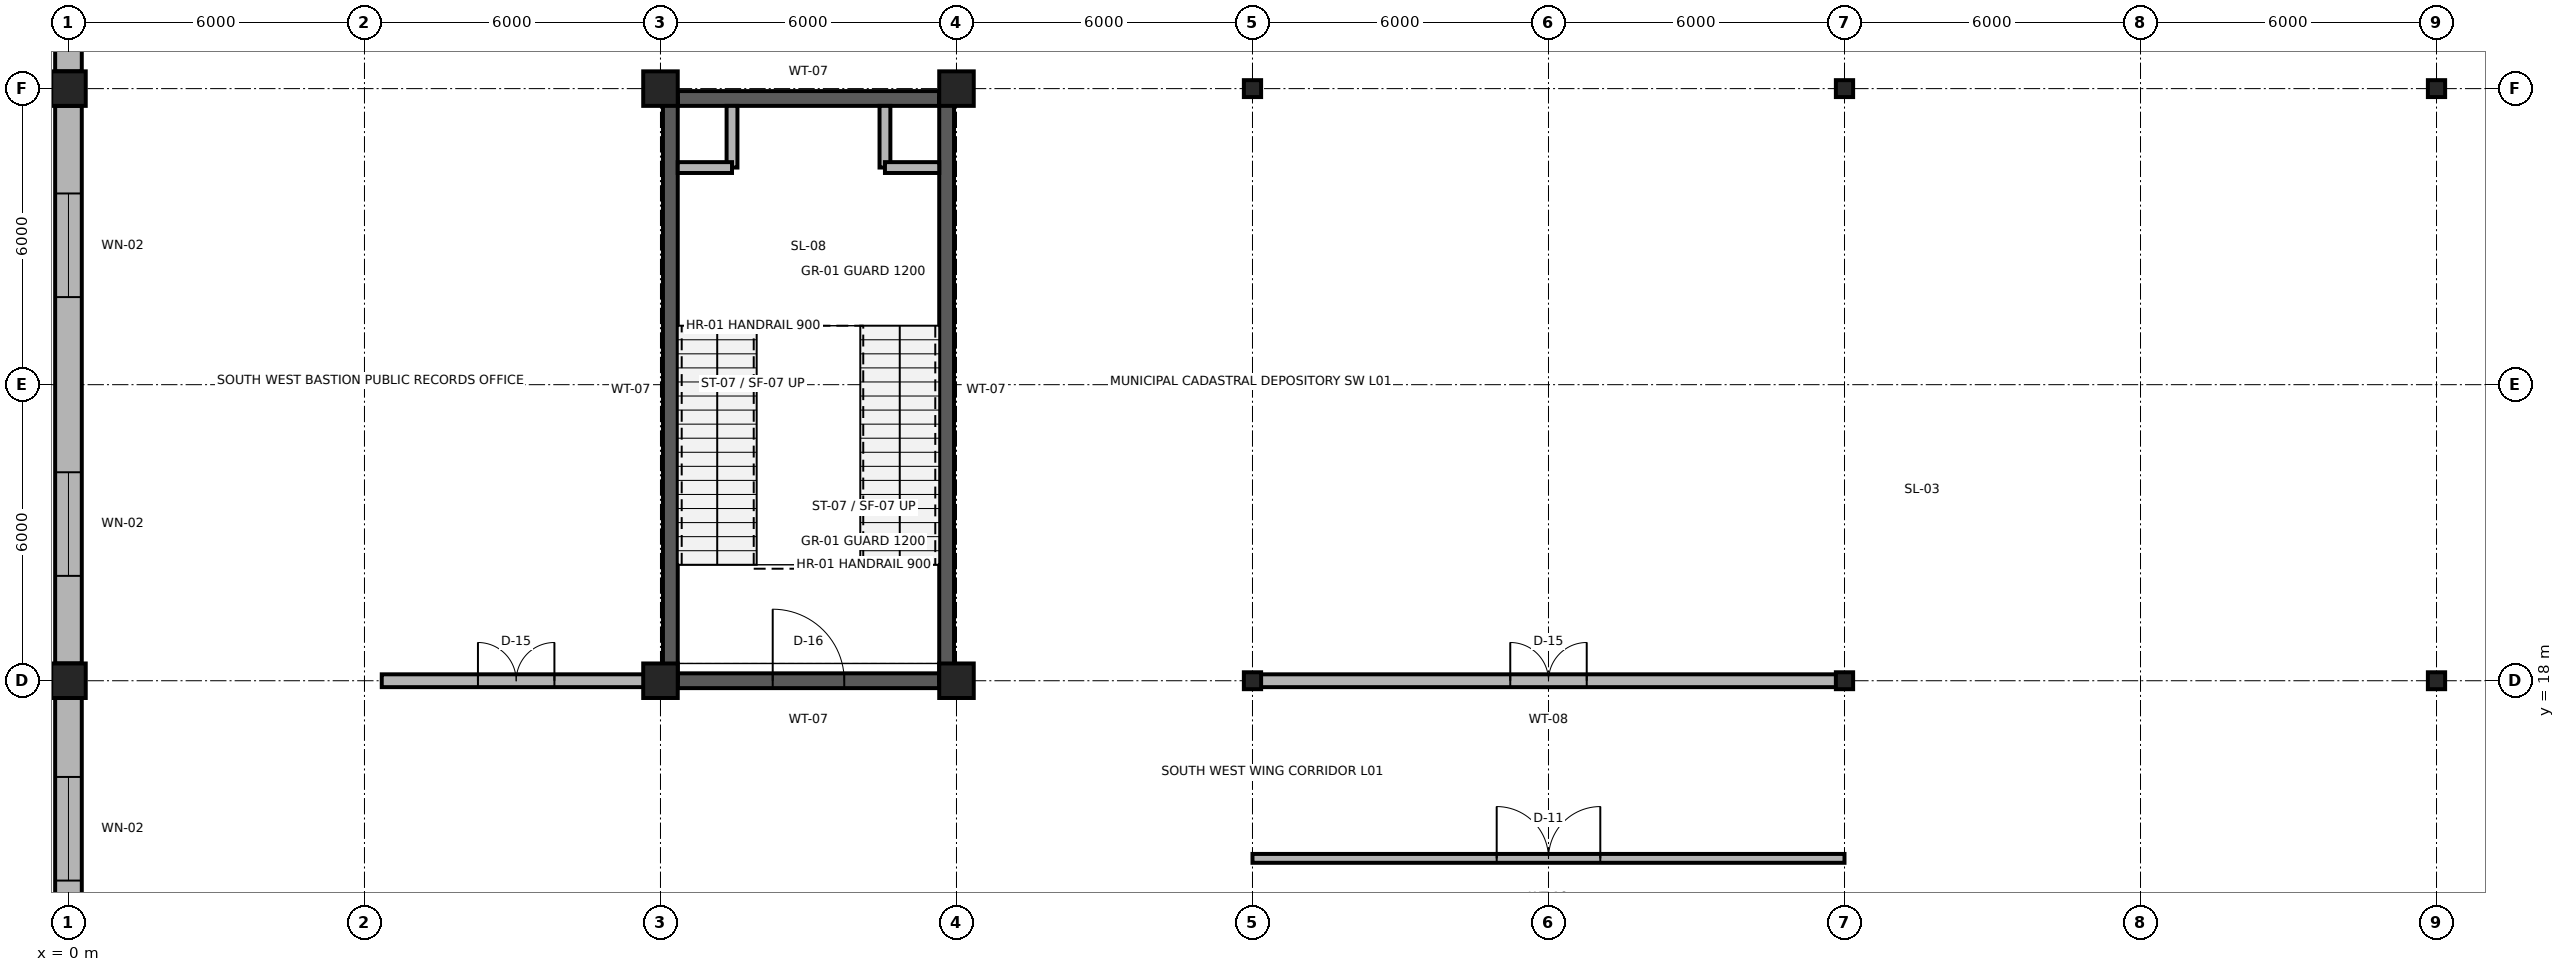
"""IFC4 building model, lengths in metres.
Left out: names, types, materials, properties, quantities, classifications, styles, units other than length and angle.
Written with IfcOpenShell. Run it as: python <this file> out.ifc"""

import sys

from ifc_helpers import new_model, si_unit, direction, frame, frame_2d, origin, origin_2d, place, context, subcontext, project, spatial, rectangle, i_section, extrude, element, fill, save


model = new_model("IFC4")
c1 = context("Model", 3, precision=1e-05, world=origin(), true_north=direction((0.0, 1.0)))
c2 = subcontext(c1, "Body", "Model", "MODEL_VIEW")
j1 = project(units=[si_unit("LENGTHUNIT", "METRE"), si_unit("PLANEANGLEUNIT", "RADIAN")], contexts=[c1])
p1 = place(None, origin())
s1 = spatial("IfcSite", under=j1, at=p1, CompositionType="ELEMENT")
p2 = place(p1, origin())
s2 = spatial("IfcBuilding", under=s1, at=p2, CompositionType="ELEMENT")
p3 = place(p2, origin())
s3 = spatial("IfcBuildingStorey", under=s2, at=p3, CompositionType="ELEMENT", Elevation=0.0)
for number, where, z_axis, x_axis in (
    (1, (0.0, 18.0, 0.0), (0.0, 0.0, 1.0), (1.0, 0.0, 0.0)),
    (2, (12.0, 18.0, 0.0), (0.0, 0.0, 1.0), (1.0, 0.0, 0.0)),
    (3, (18.0, 18.0, 0.0), (0.0, 0.0, 1.0), (1.0, 0.0, 0.0)),
):
    element("IfcColumn", number, at=place(p3, frame(where, z_axis=z_axis, x_axis=x_axis)), inside=s3, PredefinedType="COLUMN", context=c2, shape_type="SweptSolid", body=[
        extrude(rectangle(XDim=0.7, YDim=0.7, at=origin_2d()), origin(), (0.0, 0.0, 1.0), 6.0),
    ])
for number, where, z_axis, x_axis in (
    (4, (24.0, 18.0, 0.0), (0.0, 0.0, 1.0), (1.0, 0.0, 0.0)),
    (5, (36.0, 18.0, 0.0), (0.0, 0.0, 1.0), (1.0, 0.0, 0.0)),
    (6, (48.0, 18.0, 0.0), (0.0, 0.0, 1.0), (1.0, 0.0, 0.0)),
):
    element("IfcColumn", number, at=place(p3, frame(where, z_axis=z_axis, x_axis=x_axis)), inside=s3, PredefinedType="COLUMN", context=c2, shape_type="SweptSolid", body=[
        extrude(i_section(OverallWidth=0.35, OverallDepth=0.343, WebThickness=0.01, FlangeThickness=0.015, FilletRadius=0.02, at=origin_2d()), origin(), (0.0, 0.0, 1.0), 6.0),
    ])
for number, where, z_axis, x_axis in (
    (7, (0.0, 30.0, 0.0), (0.0, 0.0, 1.0), (1.0, 0.0, 0.0)),
    (8, (12.0, 30.0, 0.0), (0.0, 0.0, 1.0), (1.0, 0.0, 0.0)),
    (9, (18.0, 30.0, 0.0), (0.0, 0.0, 1.0), (1.0, 0.0, 0.0)),
):
    element("IfcColumn", number, at=place(p3, frame(where, z_axis=z_axis, x_axis=x_axis)), inside=s3, PredefinedType="COLUMN", context=c2, shape_type="SweptSolid", body=[
        extrude(rectangle(XDim=0.7, YDim=0.7, at=origin_2d()), origin(), (0.0, 0.0, 1.0), 6.0),
    ])
for number, where, z_axis, x_axis in (
    (10, (24.0, 30.0, 0.0), (0.0, 0.0, 1.0), (1.0, 0.0, 0.0)),
    (11, (36.0, 30.0, 0.0), (0.0, 0.0, 1.0), (1.0, 0.0, 0.0)),
    (12, (48.0, 30.0, 0.0), (0.0, 0.0, 1.0), (1.0, 0.0, 0.0)),
):
    element("IfcColumn", number, at=place(p3, frame(where, z_axis=z_axis, x_axis=x_axis)), inside=s3, PredefinedType="COLUMN", context=c2, shape_type="SweptSolid", body=[
        extrude(i_section(OverallWidth=0.35, OverallDepth=0.343, WebThickness=0.01, FlangeThickness=0.015, FilletRadius=0.02, at=origin_2d()), origin(), (0.0, 0.0, 1.0), 6.0),
    ])
p4 = place(p3, frame((0.0, 12.35, 0.0), z_axis=(0.0, 0.0, 1.0), x_axis=(0.0, 1.0, 0.0)))
e13 = element("IfcWall", 13, at=p4, inside=s3, PredefinedType="SOLIDWALL", context=c2, shape_type="SweptSolid", body=[
    extrude(rectangle(XDim=5.3, YDim=0.54, at=frame_2d((2.65, 0.0))), origin(), (0.0, 0.0, 1.0), 5.31),
])
p5 = place(p4, frame((1.6, 0.0, 0.85)))
e14 = element("IfcOpeningElement", 14, at=p5, cuts=e13, PredefinedType="OPENING", context=c2, shape_type="SweptSolid", body=[
    extrude(rectangle(XDim=2.1, YDim=3.4, at=frame_2d((1.05, 1.7))), frame((0.0, 0.285, 0.0), z_axis=(0.0, -1.0, 0.0), x_axis=(1.0, 0.0, 0.0)), (0.0, 0.0, 1.0), 0.57),
])
p6 = place(p3, frame((0.0, 18.35, 0.0), z_axis=(0.0, 0.0, 1.0), x_axis=(0.0, 1.0, 0.0)))
e15 = element("IfcWall", 15, at=p6, inside=s3, PredefinedType="SOLIDWALL", context=c2, shape_type="SweptSolid", body=[
    extrude(rectangle(XDim=11.3, YDim=0.54, at=frame_2d((5.65, 0.0))), origin(), (0.0, 0.0, 1.0), 5.31),
])
p7 = place(p6, frame((1.775, 0.0, 0.85)))
e16 = element("IfcOpeningElement", 16, at=p7, cuts=e15, PredefinedType="OPENING", context=c2, shape_type="SweptSolid", body=[
    extrude(rectangle(XDim=2.1, YDim=3.4, at=frame_2d((1.05, 1.7))), frame((0.0, 0.285, 0.0), z_axis=(0.0, -1.0, 0.0), x_axis=(1.0, 0.0, 0.0)), (0.0, 0.0, 1.0), 0.57),
])
p8 = place(p6, frame((7.425, 0.0, 0.85)))
e17 = element("IfcOpeningElement", 17, at=p8, cuts=e15, PredefinedType="OPENING", context=c2, shape_type="SweptSolid", body=[
    extrude(rectangle(XDim=2.1, YDim=3.4, at=frame_2d((1.05, 1.7))), frame((0.0, 0.285, 0.0), z_axis=(0.0, -1.0, 0.0), x_axis=(1.0, 0.0, 0.0)), (0.0, 0.0, 1.0), 0.57),
])
p9 = place(p3, frame((0.0, 30.35, 0.0), z_axis=(0.0, 0.0, 1.0), x_axis=(0.0, 1.0, 0.0)))
e18 = element("IfcWall", 18, at=p9, inside=s3, PredefinedType="SOLIDWALL", context=c2, shape_type="SweptSolid", body=[
    extrude(rectangle(XDim=5.3, YDim=0.54, at=frame_2d((2.65, 0.0))), origin(), (0.0, 0.0, 1.0), 5.31),
])
p10 = place(p9, frame((1.6, 0.0, 0.85)))
e19 = element("IfcOpeningElement", 19, at=p10, cuts=e18, PredefinedType="OPENING", context=c2, shape_type="SweptSolid", body=[
    extrude(rectangle(XDim=2.1, YDim=3.4, at=frame_2d((1.05, 1.7))), frame((0.0, 0.285, 0.0), z_axis=(0.0, -1.0, 0.0), x_axis=(1.0, 0.0, 0.0)), (0.0, 0.0, 1.0), 0.57),
])
p11 = place(p3, frame((12.35, 18.0, 0.0), z_axis=(0.0, 0.0, 1.0), x_axis=(1.0, 0.0, 0.0)))
e20 = element("IfcWall", 20, at=p11, inside=s3, PredefinedType="SHEAR", context=c2, shape_type="SweptSolid", body=[
    extrude(rectangle(XDim=5.3, YDim=0.3, at=frame_2d((2.65, 0.0))), origin(), (0.0, 0.0, 1.0), 5.76),
])
p12 = place(p11, frame((1.925, 0.0, 0.0)))
e21 = element("IfcOpeningElement", 21, at=p12, cuts=e20, PredefinedType="OPENING", context=c2, shape_type="SweptSolid", body=[
    extrude(rectangle(XDim=1.45, YDim=2.25, at=frame_2d((0.725, 1.125))), frame((0.0, 0.165, 0.0), z_axis=(0.0, -1.0, 0.0), x_axis=(1.0, 0.0, 0.0)), (0.0, 0.0, 1.0), 0.33),
])
p13 = place(p3, frame((12.35, 29.8, 0.0), z_axis=(0.0, 0.0, 1.0), x_axis=(1.0, 0.0, 0.0)))
e22 = element("IfcWall", 22, at=p13, inside=s3, PredefinedType="SHEAR", context=c2, shape_type="SweptSolid", body=[
    extrude(rectangle(XDim=5.3, YDim=0.3, at=frame_2d((2.65, 0.0))), origin(), (0.0, 0.0, 1.0), 5.76),
])
for number, where, z_axis, x_axis in (
    (23, (12.2, 18.0, 0.0), (0.0, 0.0, 1.0), (0.0, 1.0, 0.0)),
    (24, (17.8, 18.0, 0.0), (0.0, 0.0, 1.0), (0.0, 1.0, 0.0)),
):
    element("IfcWall", number, at=place(p3, frame(where, z_axis=z_axis, x_axis=x_axis)), inside=s3, PredefinedType="SHEAR", context=c2, shape_type="SweptSolid", body=[
        extrude(rectangle(XDim=11.8, YDim=0.3, at=frame_2d((5.9, 0.0))), origin(), (0.0, 0.0, 1.0), 5.76),
    ])
p14 = place(p3, frame((13.45, 28.4, 0.0), z_axis=(0.0, 0.0, 1.0), x_axis=(0.0, 1.0, 0.0)))
e25 = element("IfcWall", 25, at=p14, inside=s3, PredefinedType="PARTITIONING", context=c2, shape_type="SweptSolid", body=[
    extrude(rectangle(XDim=1.25, YDim=0.22, at=frame_2d((0.625, 0.0))), origin(), (0.0, 0.0, 1.0), 5.76),
])
p15 = place(p3, frame((12.35, 28.4, 0.0), z_axis=(0.0, 0.0, 1.0), x_axis=(1.0, 0.0, 0.0)))
e26 = element("IfcWall", 26, at=p15, inside=s3, PredefinedType="PARTITIONING", context=c2, shape_type="SweptSolid", body=[
    extrude(rectangle(XDim=1.1, YDim=0.22, at=frame_2d((0.55, 0.0))), origin(), (0.0, 0.0, 1.0), 5.76),
])
p16 = place(p3, frame((16.55, 28.4, 0.0), z_axis=(0.0, 0.0, 1.0), x_axis=(0.0, 1.0, 0.0)))
e27 = element("IfcWall", 27, at=p16, inside=s3, PredefinedType="PARTITIONING", context=c2, shape_type="SweptSolid", body=[
    extrude(rectangle(XDim=1.25, YDim=0.22, at=frame_2d((0.625, 0.0))), origin(), (0.0, 0.0, 1.0), 5.76),
])
p17 = place(p3, frame((16.55, 28.4, 0.0), z_axis=(0.0, 0.0, 1.0), x_axis=(1.0, 0.0, 0.0)))
e28 = element("IfcWall", 28, at=p17, inside=s3, PredefinedType="PARTITIONING", context=c2, shape_type="SweptSolid", body=[
    extrude(rectangle(XDim=1.1, YDim=0.22, at=frame_2d((0.55, 0.0))), origin(), (0.0, 0.0, 1.0), 5.76),
])
p18 = place(p3, frame((24.0, 14.4, 0.0), z_axis=(0.0, 0.0, 1.0), x_axis=(1.0, 0.0, 0.0)))
e29 = element("IfcWall", 29, at=p18, inside=s3, PredefinedType="PARTITIONING", context=c2, shape_type="SweptSolid", body=[
    extrude(rectangle(XDim=12.0, YDim=0.18, at=frame_2d((6.0, 0.0))), origin(), (0.0, 0.0, 1.0), 5.76),
])
p19 = place(p18, frame((4.95, 0.0, 0.0)))
e30 = element("IfcOpeningElement", 30, at=p19, cuts=e29, PredefinedType="OPENING", context=c2, shape_type="SweptSolid", body=[
    extrude(rectangle(XDim=2.1, YDim=2.9, at=frame_2d((1.05, 1.45))), frame((0.0, 0.105, 0.0), z_axis=(0.0, -1.0, 0.0), x_axis=(1.0, 0.0, 0.0)), (0.0, 0.0, 1.0), 0.21),
])
p20 = place(p3, frame((24.0, 18.0, 0.0), z_axis=(0.0, 0.0, 1.0), x_axis=(1.0, 0.0, 0.0)))
e31 = element("IfcWall", 31, at=p20, inside=s3, PredefinedType="PARTITIONING", context=c2, shape_type="SweptSolid", body=[
    extrude(rectangle(XDim=12.0, YDim=0.26, at=frame_2d((6.0, 0.0))), origin(), (0.0, 0.0, 1.0), 5.077),
])
p21 = place(p20, frame((5.225, 0.0, 0.0)))
e32 = element("IfcOpeningElement", 32, at=p21, cuts=e31, PredefinedType="OPENING", context=c2, shape_type="SweptSolid", body=[
    extrude(rectangle(XDim=1.55, YDim=2.3, at=frame_2d((0.775, 1.15))), frame((0.0, 0.145, 0.0), z_axis=(0.0, -1.0, 0.0), x_axis=(1.0, 0.0, 0.0)), (0.0, 0.0, 1.0), 0.29),
])
p22 = place(p3, frame((6.35, 18.0, 0.0), z_axis=(0.0, 0.0, 1.0), x_axis=(1.0, 0.0, 0.0)))
e33 = element("IfcWall", 33, at=p22, inside=s3, PredefinedType="PARTITIONING", context=c2, shape_type="SweptSolid", body=[
    extrude(rectangle(XDim=5.45, YDim=0.26, at=frame_2d((2.725, 0.0))), origin(), (0.0, 0.0, 1.0), 5.077),
])
p23 = place(p22, frame((1.95, 0.0, 0.0)))
e34 = element("IfcOpeningElement", 34, at=p23, cuts=e33, PredefinedType="OPENING", context=c2, shape_type="SweptSolid", body=[
    extrude(rectangle(XDim=1.55, YDim=2.3, at=frame_2d((0.775, 1.15))), frame((0.0, 0.145, 0.0), z_axis=(0.0, -1.0, 0.0), x_axis=(1.0, 0.0, 0.0)), (0.0, 0.0, 1.0), 0.29),
])
p24 = place(p5, origin())
e35 = element("IfcWindow", 35, at=p24, inside=s3, PartitioningType="SINGLE_PANEL", PredefinedType="WINDOW", context=c2, shape_type="SweptSolid", body=[
    extrude(rectangle(XDim=2.1, YDim=3.4, at=frame_2d((1.05, 1.7))), frame((0.0, 0.03, 0.0), z_axis=(0.0, -1.0, 0.0), x_axis=(1.0, 0.0, 0.0)), (0.0, 0.0, 1.0), 0.06),
])
fill(e14, e35)
p25 = place(p7, origin())
e36 = element("IfcWindow", 36, at=p25, inside=s3, PartitioningType="SINGLE_PANEL", PredefinedType="WINDOW", context=c2, shape_type="SweptSolid", body=[
    extrude(rectangle(XDim=2.1, YDim=3.4, at=frame_2d((1.05, 1.7))), frame((0.0, 0.03, 0.0), z_axis=(0.0, -1.0, 0.0), x_axis=(1.0, 0.0, 0.0)), (0.0, 0.0, 1.0), 0.06),
])
fill(e16, e36)
p26 = place(p8, origin())
e37 = element("IfcWindow", 37, at=p26, inside=s3, PartitioningType="SINGLE_PANEL", PredefinedType="WINDOW", context=c2, shape_type="SweptSolid", body=[
    extrude(rectangle(XDim=2.1, YDim=3.4, at=frame_2d((1.05, 1.7))), frame((0.0, 0.03, 0.0), z_axis=(0.0, -1.0, 0.0), x_axis=(1.0, 0.0, 0.0)), (0.0, 0.0, 1.0), 0.06),
])
fill(e17, e37)
p27 = place(p12, origin())
e38 = element("IfcDoor", 38, at=p27, inside=s3, OperationType="SINGLE_SWING_LEFT", PredefinedType="DOOR", context=c2, shape_type="SweptSolid", body=[
    extrude(rectangle(XDim=1.45, YDim=2.25, at=frame_2d((0.725, 1.125))), frame((0.0, 0.025, 0.0), z_axis=(0.0, -1.0, 0.0), x_axis=(1.0, 0.0, 0.0)), (0.0, 0.0, 1.0), 0.05),
])
fill(e21, e38)
p28 = place(p19, origin())
e39 = element("IfcDoor", 39, at=p28, inside=s3, OperationType="DOUBLE_DOOR_SINGLE_SWING", PredefinedType="DOOR", context=c2, shape_type="SweptSolid", body=[
    extrude(rectangle(XDim=2.1, YDim=2.9, at=frame_2d((1.05, 1.45))), frame((0.0, 0.025, 0.0), z_axis=(0.0, -1.0, 0.0), x_axis=(1.0, 0.0, 0.0)), (0.0, 0.0, 1.0), 0.05),
])
fill(e30, e39)
p29 = place(p21, origin())
e40 = element("IfcDoor", 40, at=p29, inside=s3, OperationType="DOUBLE_DOOR_SINGLE_SWING", PredefinedType="DOOR", context=c2, shape_type="SweptSolid", body=[
    extrude(rectangle(XDim=1.55, YDim=2.3, at=frame_2d((0.775, 1.15))), frame((0.0, 0.025, 0.0), z_axis=(0.0, -1.0, 0.0), x_axis=(1.0, 0.0, 0.0)), (0.0, 0.0, 1.0), 0.05),
])
fill(e32, e40)
p30 = place(p23, origin())
e41 = element("IfcDoor", 41, at=p30, inside=s3, OperationType="DOUBLE_DOOR_SINGLE_SWING", PredefinedType="DOOR", context=c2, shape_type="SweptSolid", body=[
    extrude(rectangle(XDim=1.55, YDim=2.3, at=frame_2d((0.775, 1.15))), frame((0.0, 0.025, 0.0), z_axis=(0.0, -1.0, 0.0), x_axis=(1.0, 0.0, 0.0)), (0.0, 0.0, 1.0), 0.05),
])
fill(e34, e41)
save(model, sys.argv[1])
